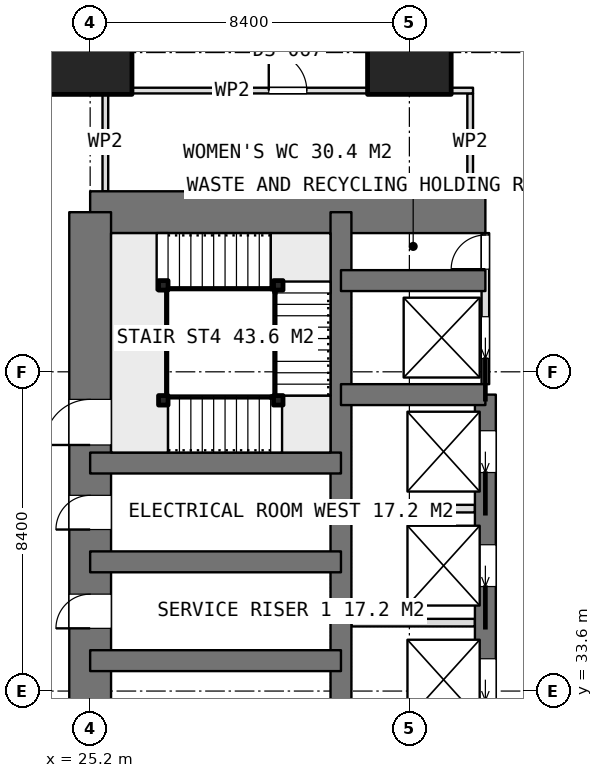
"""IFC4 building model, lengths in metres.
Left out: names, types, materials, properties, quantities, classifications, styles, units other than length and angle.
Written with IfcOpenShell. Run it as: python <this file> out.ifc"""

import sys

from ifc_helpers import new_model, si_unit, direction, frame, frame_2d, origin, origin_2d, place, context, subcontext, project, spatial, rectangle, extrude, element, fill, save


model = new_model("IFC4")
c1 = context("Model", 3, precision=1e-05, world=origin(), true_north=direction((0.0, 1.0)))
c2 = subcontext(c1, "Body", "Model", "MODEL_VIEW")
j1 = project(units=[si_unit("LENGTHUNIT", "METRE"), si_unit("PLANEANGLEUNIT", "RADIAN")], contexts=[c1])
p1 = place(None, origin())
s1 = spatial("IfcSite", under=j1, at=p1, CompositionType="ELEMENT")
p2 = place(p1, origin())
s2 = spatial("IfcBuilding", under=s1, at=p2, CompositionType="ELEMENT")
p3 = place(p2, frame((0.0, 0.0, 59.15)))
s3 = spatial("IfcBuildingStorey", under=s2, at=p3, CompositionType="ELEMENT", Elevation=59.15)
p4 = place(p3, frame((25.2, 46.2, 0.0), z_axis=(0.0, 0.0, 1.0), x_axis=(1.0, 0.0, 0.0)))
e1 = element("IfcWall", 1, at=p4, inside=s3, PredefinedType="SHEAR", context=c2, shape_type="SweptSolid", body=[
    extrude(rectangle(XDim=10.4, YDim=1.1, at=frame_2d((5.2, 0.0))), origin(), (0.0, 0.0, 1.0), 3.75),
])
p5 = place(p3, frame((25.2, 21.0, 0.0), z_axis=(0.0, 0.0, 1.0), x_axis=(0.0, 1.0, 0.0)))
e2 = element("IfcWall", 2, at=p5, inside=s3, PredefinedType="SHEAR", context=c2, shape_type="SweptSolid", body=[
    extrude(rectangle(XDim=25.2, YDim=1.1, at=frame_2d((12.6, 0.0))), origin(), (0.0, 0.0, 1.0), 3.75),
])
p6 = place(p5, frame((7.8, 0.0, 0.0)))
e3 = element("IfcOpeningElement", 3, at=p6, cuts=e2, PredefinedType="OPENING", context=c2, shape_type="SweptSolid", body=[
    extrude(rectangle(XDim=1.2, YDim=2.1, at=frame_2d((0.6, 1.05))), frame((0.0, 0.56, 0.0), z_axis=(0.0, -1.0, 0.0), x_axis=(1.0, 0.0, 0.0)), (0.0, 0.0, 1.0), 1.12),
])
p7 = place(p5, frame((14.25, 0.0, 0.0)))
e4 = element("IfcOpeningElement", 4, at=p7, cuts=e2, PredefinedType="OPENING", context=c2, shape_type="SweptSolid", body=[
    extrude(rectangle(XDim=0.9, YDim=2.1, at=frame_2d((0.45, 1.05))), frame((0.0, 0.56, 0.0), z_axis=(0.0, -1.0, 0.0), x_axis=(1.0, 0.0, 0.0)), (0.0, 0.0, 1.0), 1.12),
])
p8 = place(p5, frame((16.85, 0.0, 0.0)))
e5 = element("IfcOpeningElement", 5, at=p8, cuts=e2, PredefinedType="OPENING", context=c2, shape_type="SweptSolid", body=[
    extrude(rectangle(XDim=0.9, YDim=2.1, at=frame_2d((0.45, 1.05))), frame((0.0, 0.56, 0.0), z_axis=(0.0, -1.0, 0.0), x_axis=(1.0, 0.0, 0.0)), (0.0, 0.0, 1.0), 1.12),
])
p9 = place(p5, frame((19.075, 0.0, 0.0)))
e6 = element("IfcOpeningElement", 6, at=p9, cuts=e2, PredefinedType="OPENING", context=c2, shape_type="SweptSolid", body=[
    extrude(rectangle(XDim=1.2, YDim=2.1, at=frame_2d((0.6, 1.05))), frame((0.0, 0.56, 0.0), z_axis=(0.0, -1.0, 0.0), x_axis=(1.0, 0.0, 0.0)), (0.0, 0.0, 1.0), 1.12),
])
p10 = place(p3, frame((31.8, 21.0, 0.0), z_axis=(0.0, 0.0, 1.0), x_axis=(0.0, 1.0, 0.0)))
e7 = element("IfcWall", 7, at=p10, inside=s3, PredefinedType="SHEAR", context=c2, shape_type="SweptSolid", body=[
    extrude(rectangle(XDim=25.2, YDim=0.55, at=frame_2d((12.6, 0.0))), origin(), (0.0, 0.0, 1.0), 3.75),
])
p11 = place(p3, frame((35.6, 23.4, 0.0), z_axis=(0.0, 0.0, 1.0), x_axis=(0.0, 1.0, 0.0)))
e8 = element("IfcWall", 8, at=p11, inside=s3, PredefinedType="SHEAR", context=c2, shape_type="SweptSolid", body=[
    extrude(rectangle(XDim=18.0, YDim=0.55, at=frame_2d((9.0, 0.0))), origin(), (0.0, 0.0, 1.0), 3.75),
])
p12 = place(p11, frame((0.95, 0.0, 0.0)))
e9 = element("IfcOpeningElement", 9, at=p12, cuts=e8, PredefinedType="OPENING", context=c2, shape_type="SweptSolid", body=[
    extrude(rectangle(XDim=1.1, YDim=2.1, at=frame_2d((0.55, 1.05))), frame((0.0, 0.285, 0.0), z_axis=(0.0, -1.0, 0.0), x_axis=(1.0, 0.0, 0.0)), (0.0, 0.0, 1.0), 0.57),
])
p13 = place(p11, frame((3.95, 0.0, 0.0)))
e10 = element("IfcOpeningElement", 10, at=p13, cuts=e8, PredefinedType="OPENING", context=c2, shape_type="SweptSolid", body=[
    extrude(rectangle(XDim=1.1, YDim=2.1, at=frame_2d((0.55, 1.05))), frame((0.0, 0.285, 0.0), z_axis=(0.0, -1.0, 0.0), x_axis=(1.0, 0.0, 0.0)), (0.0, 0.0, 1.0), 0.57),
])
p14 = place(p11, frame((6.95, 0.0, 0.0)))
e11 = element("IfcOpeningElement", 11, at=p14, cuts=e8, PredefinedType="OPENING", context=c2, shape_type="SweptSolid", body=[
    extrude(rectangle(XDim=1.1, YDim=2.1, at=frame_2d((0.55, 1.05))), frame((0.0, 0.285, 0.0), z_axis=(0.0, -1.0, 0.0), x_axis=(1.0, 0.0, 0.0)), (0.0, 0.0, 1.0), 0.57),
])
p15 = place(p11, frame((9.95, 0.0, 0.0)))
e12 = element("IfcOpeningElement", 12, at=p15, cuts=e8, PredefinedType="OPENING", context=c2, shape_type="SweptSolid", body=[
    extrude(rectangle(XDim=1.1, YDim=2.1, at=frame_2d((0.55, 1.05))), frame((0.0, 0.285, 0.0), z_axis=(0.0, -1.0, 0.0), x_axis=(1.0, 0.0, 0.0)), (0.0, 0.0, 1.0), 0.57),
])
p16 = place(p11, frame((12.95, 0.0, 0.0)))
e13 = element("IfcOpeningElement", 13, at=p16, cuts=e8, PredefinedType="OPENING", context=c2, shape_type="SweptSolid", body=[
    extrude(rectangle(XDim=1.1, YDim=2.1, at=frame_2d((0.55, 1.05))), frame((0.0, 0.285, 0.0), z_axis=(0.0, -1.0, 0.0), x_axis=(1.0, 0.0, 0.0)), (0.0, 0.0, 1.0), 0.57),
])
p17 = place(p11, frame((15.95, 0.0, 0.0)))
e14 = element("IfcOpeningElement", 14, at=p17, cuts=e8, PredefinedType="OPENING", context=c2, shape_type="SweptSolid", body=[
    extrude(rectangle(XDim=1.1, YDim=2.1, at=frame_2d((0.55, 1.05))), frame((0.0, 0.285, 0.0), z_axis=(0.0, -1.0, 0.0), x_axis=(1.0, 0.0, 0.0)), (0.0, 0.0, 1.0), 0.57),
])
for number, where, z_axis, x_axis in (
    (15, (31.8, 41.4, 0.0), (0.0, 0.0, 1.0), (1.0, 0.0, 0.0)),
    (16, (31.8, 44.4, 0.0), (0.0, 0.0, 1.0), (1.0, 0.0, 0.0)),
):
    element("IfcWall", number, at=place(p3, frame(where, z_axis=z_axis, x_axis=x_axis)), inside=s3, PredefinedType="SHEAR", context=c2, shape_type="SweptSolid", body=[
        extrude(rectangle(XDim=3.8, YDim=0.55, at=frame_2d((1.9, 0.0))), origin(), (0.0, 0.0, 1.0), 3.75),
    ])
for number, where, z_axis, x_axis in (
    (17, (25.2, 34.4, 0.0), (0.0, 0.0, 1.0), (1.0, 0.0, 0.0)),
    (18, (25.2, 37.0, 0.0), (0.0, 0.0, 1.0), (1.0, 0.0, 0.0)),
    (19, (25.2, 39.6, 0.0), (0.0, 0.0, 1.0), (1.0, 0.0, 0.0)),
):
    element("IfcWall", number, at=place(p3, frame(where, z_axis=z_axis, x_axis=x_axis)), inside=s3, PredefinedType="SHEAR", context=c2, shape_type="SweptSolid", body=[
        extrude(rectangle(XDim=6.6, YDim=0.55, at=frame_2d((3.3, 0.0))), origin(), (0.0, 0.0, 1.0), 3.75),
    ])
for number, where, z_axis, x_axis in (
    (20, (25.2, 50.4, 0.0), (0.0, 0.0, 1.0), (1.0, 0.0, 0.0)),
    (21, (33.6, 50.4, 0.0), (0.0, 0.0, 1.0), (1.0, 0.0, 0.0)),
):
    element("IfcColumn", number, at=place(p3, frame(where, z_axis=z_axis, x_axis=x_axis)), inside=s3, PredefinedType="COLUMN", context=c2, shape_type="SweptSolid", body=[
        extrude(rectangle(XDim=2.2, YDim=2.2, at=origin_2d()), origin(), (0.0, 0.0, 1.0), 3.75),
    ])
for number, where, z_axis, x_axis in (
    (22, (32.075, 35.4, 0.0), (0.0, 0.0, 1.0), (1.0, 0.0, 0.0)),
    (23, (32.075, 38.4, 0.0), (0.0, 0.0, 1.0), (1.0, 0.0, 0.0)),
):
    element("IfcWall", number, at=place(p3, frame(where, z_axis=z_axis, x_axis=x_axis)), inside=s3, PredefinedType="PARTITIONING", context=c2, shape_type="SweptSolid", body=[
        extrude(rectangle(XDim=3.25, YDim=0.2, at=frame_2d((1.625, 0.0))), origin(), (0.0, 0.0, 1.0), 3.5),
    ])
p18 = place(p3, frame((35.6, 41.675, 0.0), z_axis=(0.0, 0.0, 1.0), x_axis=(0.0, 1.0, 0.0)))
e24 = element("IfcWall", 24, at=p18, inside=s3, PredefinedType="PARTITIONING", context=c2, shape_type="SweptSolid", body=[
    extrude(rectangle(XDim=3.975, YDim=0.2, at=frame_2d((1.987, 0.0))), origin(), (0.0, 0.0, 1.0), 3.5),
])
p19 = place(p18, frame((3.025, 0.0, 0.0)))
e25 = element("IfcOpeningElement", 25, at=p19, cuts=e24, PredefinedType="OPENING", context=c2, shape_type="SweptSolid", body=[
    extrude(rectangle(XDim=0.9, YDim=2.1, at=frame_2d((0.45, 1.05))), frame((0.0, 0.11, 0.0), z_axis=(0.0, -1.0, 0.0), x_axis=(1.0, 0.0, 0.0)), (0.0, 0.0, 1.0), 0.22),
])
p20 = place(p18, frame((0.675, 0.0, 0.0)))
e26 = element("IfcOpeningElement", 26, at=p20, cuts=e24, PredefinedType="OPENING", context=c2, shape_type="SweptSolid", body=[
    extrude(rectangle(XDim=1.1, YDim=2.1, at=frame_2d((0.55, 1.05))), frame((0.0, 0.11, 0.0), z_axis=(0.0, -1.0, 0.0), x_axis=(1.0, 0.0, 0.0)), (0.0, 0.0, 1.0), 0.22),
])
p21 = place(p3, frame((25.525, 49.4, 0.0), z_axis=(0.0, 0.0, 1.0), x_axis=(1.0, 0.0, 0.0)))
e27 = element("IfcWall", 27, at=p21, inside=s3, PredefinedType="PARTITIONING", context=c2, shape_type="SweptSolid", body=[
    extrude(rectangle(XDim=9.75, YDim=0.15, at=frame_2d((4.875, 0.0))), origin(), (0.0, 0.0, 1.0), 3.5),
])
p22 = place(p21, frame((4.375, 0.0, 0.0)))
e28 = element("IfcOpeningElement", 28, at=p22, cuts=e27, PredefinedType="OPENING", context=c2, shape_type="SweptSolid", body=[
    extrude(rectangle(XDim=1.0, YDim=2.1, at=frame_2d((0.5, 1.05))), frame((0.0, 0.085, 0.0), z_axis=(0.0, -1.0, 0.0), x_axis=(1.0, 0.0, 0.0)), (0.0, 0.0, 1.0), 0.17),
])
for number, where, z_axis, x_axis in (
    (29, (25.6, 46.75, 0.0), (0.0, 0.0, 1.0), (0.0, 1.0, 0.0)),
    (30, (35.2, 46.75, 0.0), (0.0, 0.0, 1.0), (0.0, 1.0, 0.0)),
):
    element("IfcWall", number, at=place(p3, frame(where, z_axis=z_axis, x_axis=x_axis)), inside=s3, PredefinedType="PARTITIONING", context=c2, shape_type="SweptSolid", body=[
        extrude(rectangle(XDim=2.575, YDim=0.15, at=frame_2d((1.288, 0.0))), origin(), (0.0, 0.0, 1.0), 3.5),
    ])
for number, where, z_axis, x_axis in (
    (31, (27.125, 41.25, 0.0), (0.0, 0.0, 1.0), (1.0, 0.0, 0.0)),
    (32, (30.15, 41.25, 0.0), (0.0, 0.0, 1.0), (1.0, 0.0, 0.0)),
    (33, (30.15, 44.275, 0.0), (0.0, 0.0, 1.0), (1.0, 0.0, 0.0)),
    (34, (27.125, 44.275, 0.0), (0.0, 0.0, 1.0), (1.0, 0.0, 0.0)),
):
    element("IfcColumn", number, at=place(p3, frame(where, z_axis=z_axis, x_axis=x_axis)), inside=s3, PredefinedType="COLUMN", context=c2, shape_type="SweptSolid", body=[
        extrude(rectangle(XDim=0.25, YDim=0.25, at=origin_2d()), origin(), (0.0, 0.0, 1.0), 3.75),
    ])
p23 = place(p7, origin())
e35 = element("IfcDoor", 35, at=p23, inside=s3, OperationType="SINGLE_SWING_LEFT", PredefinedType="DOOR", context=c2, shape_type="SweptSolid", body=[
    extrude(rectangle(XDim=0.9, YDim=2.1, at=frame_2d((0.45, 1.05))), frame((0.0, 0.025, 0.0), z_axis=(0.0, -1.0, 0.0), x_axis=(1.0, 0.0, 0.0)), (0.0, 0.0, 1.0), 0.05),
])
fill(e4, e35)
p24 = place(p8, origin())
e36 = element("IfcDoor", 36, at=p24, inside=s3, OperationType="SINGLE_SWING_LEFT", PredefinedType="DOOR", context=c2, shape_type="SweptSolid", body=[
    extrude(rectangle(XDim=0.9, YDim=2.1, at=frame_2d((0.45, 1.05))), frame((0.0, 0.025, 0.0), z_axis=(0.0, -1.0, 0.0), x_axis=(1.0, 0.0, 0.0)), (0.0, 0.0, 1.0), 0.05),
])
fill(e5, e36)
p25 = place(p19, origin())
e37 = element("IfcDoor", 37, at=p25, inside=s3, OperationType="SINGLE_SWING_LEFT", PredefinedType="DOOR", context=c2, shape_type="SweptSolid", body=[
    extrude(rectangle(XDim=0.9, YDim=2.1, at=frame_2d((0.45, 1.05))), frame((0.0, 0.025, 0.0), z_axis=(0.0, -1.0, 0.0), x_axis=(1.0, 0.0, 0.0)), (0.0, 0.0, 1.0), 0.05),
])
fill(e25, e37)
p26 = place(p15, origin())
e38 = element("IfcDoor", 38, at=p26, inside=s3, OperationType="SLIDING_TO_LEFT", PredefinedType="USERDEFINED", context=c2, shape_type="SweptSolid", body=[
    extrude(rectangle(XDim=1.1, YDim=2.1, at=frame_2d((0.55, 1.05))), frame((0.0, 0.025, 0.0), z_axis=(0.0, -1.0, 0.0), x_axis=(1.0, 0.0, 0.0)), (0.0, 0.0, 1.0), 0.05),
])
fill(e12, e38)
p27 = place(p16, origin())
e39 = element("IfcDoor", 39, at=p27, inside=s3, OperationType="SLIDING_TO_LEFT", PredefinedType="USERDEFINED", context=c2, shape_type="SweptSolid", body=[
    extrude(rectangle(XDim=1.1, YDim=2.1, at=frame_2d((0.55, 1.05))), frame((0.0, 0.025, 0.0), z_axis=(0.0, -1.0, 0.0), x_axis=(1.0, 0.0, 0.0)), (0.0, 0.0, 1.0), 0.05),
])
fill(e13, e39)
p28 = place(p17, origin())
e40 = element("IfcDoor", 40, at=p28, inside=s3, OperationType="SLIDING_TO_LEFT", PredefinedType="USERDEFINED", context=c2, shape_type="SweptSolid", body=[
    extrude(rectangle(XDim=1.1, YDim=2.1, at=frame_2d((0.55, 1.05))), frame((0.0, 0.025, 0.0), z_axis=(0.0, -1.0, 0.0), x_axis=(1.0, 0.0, 0.0)), (0.0, 0.0, 1.0), 0.05),
])
fill(e14, e40)
p29 = place(p20, origin())
e41 = element("IfcDoor", 41, at=p29, inside=s3, OperationType="SLIDING_TO_LEFT", PredefinedType="USERDEFINED", context=c2, shape_type="SweptSolid", body=[
    extrude(rectangle(XDim=1.1, YDim=2.1, at=frame_2d((0.55, 1.05))), frame((0.0, 0.025, 0.0), z_axis=(0.0, -1.0, 0.0), x_axis=(1.0, 0.0, 0.0)), (0.0, 0.0, 1.0), 0.05),
])
fill(e26, e41)
p30 = place(p22, origin())
e42 = element("IfcDoor", 42, at=p30, inside=s3, OperationType="SINGLE_SWING_LEFT", PredefinedType="DOOR", context=c2, shape_type="SweptSolid", body=[
    extrude(rectangle(XDim=1.0, YDim=2.1, at=frame_2d((0.5, 1.05))), frame((0.0, 0.025, 0.0), z_axis=(0.0, -1.0, 0.0), x_axis=(1.0, 0.0, 0.0)), (0.0, 0.0, 1.0), 0.05),
])
fill(e28, e42)
p31 = place(p9, origin())
e43 = element("IfcDoor", 43, at=p31, inside=s3, OperationType="SINGLE_SWING_RIGHT", PredefinedType="DOOR", context=c2, shape_type="SweptSolid", body=[
    extrude(rectangle(XDim=1.2, YDim=2.1, at=frame_2d((0.6, 1.05))), frame((0.0, 0.025, 0.0), z_axis=(0.0, -1.0, 0.0), x_axis=(1.0, 0.0, 0.0)), (0.0, 0.0, 1.0), 0.05),
])
fill(e6, e43)
save(model, sys.argv[1])
